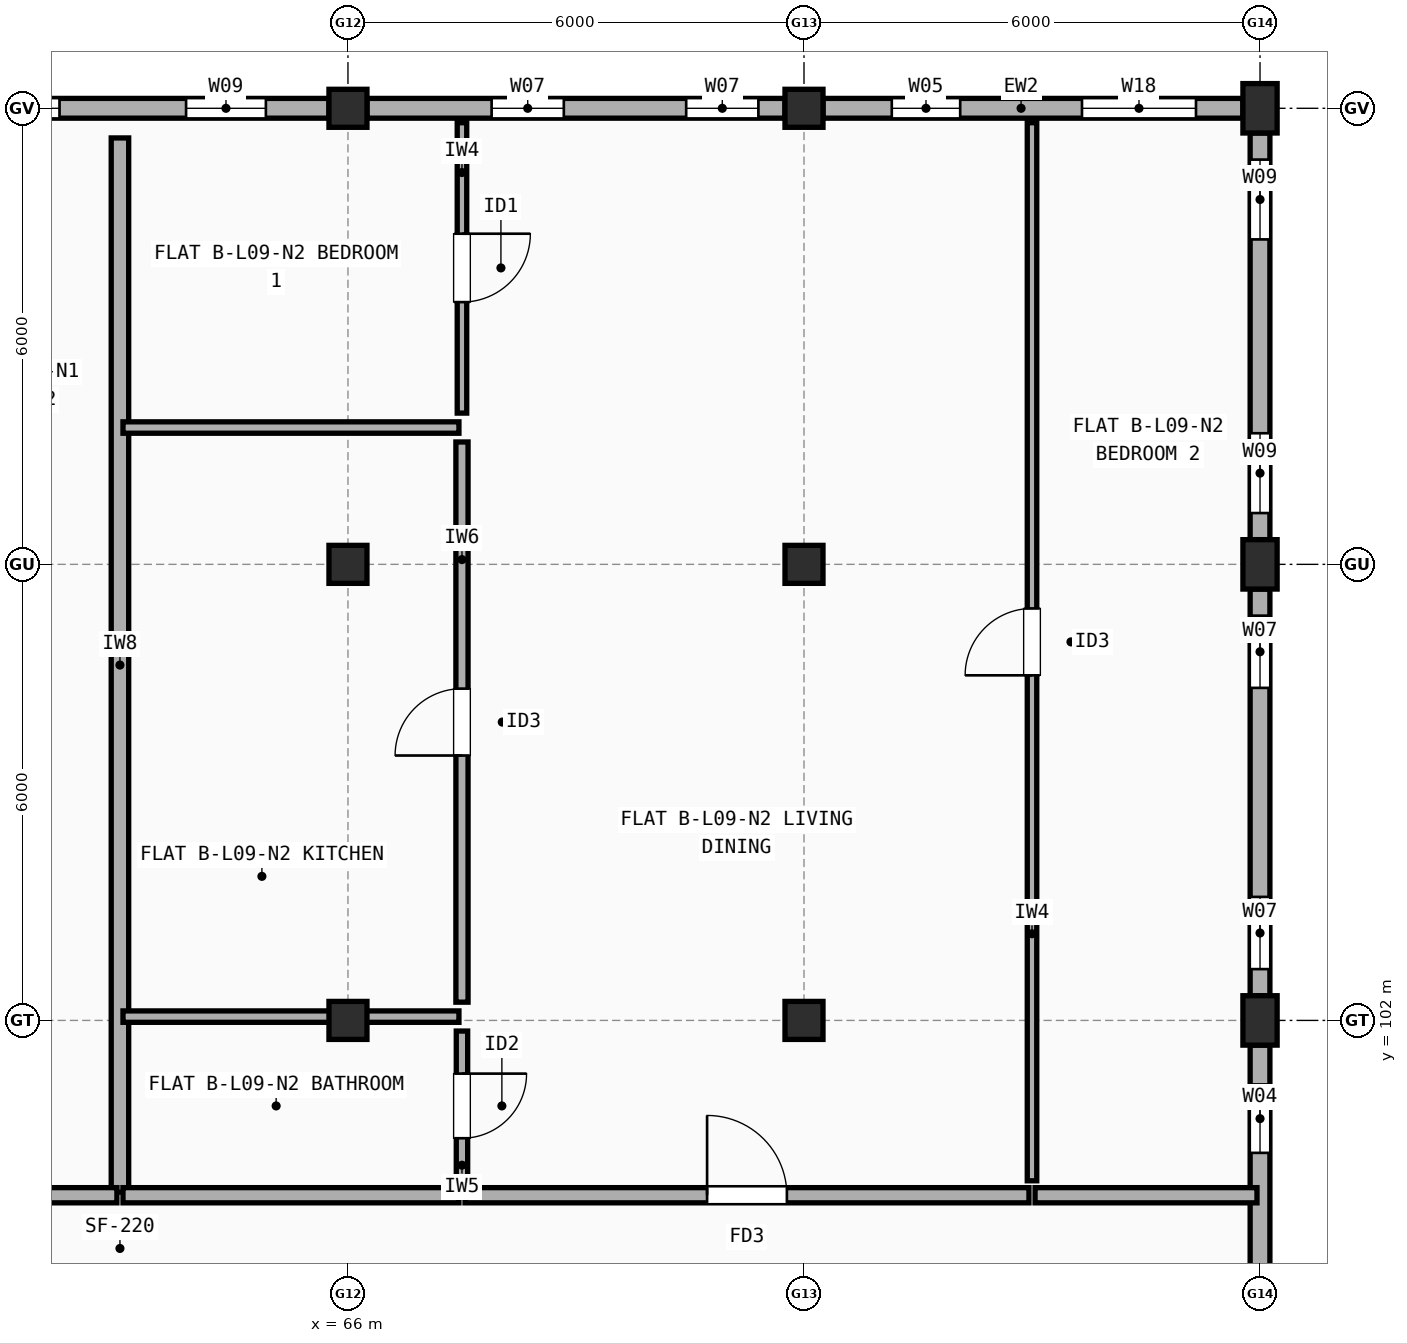
"""IFC4 building model, lengths in metres.
Left out: names, types, materials, properties, quantities, classifications, styles, units other than length and angle.
Written with IfcOpenShell. Run it as: python <this file> out.ifc"""

import sys

from ifc_helpers import new_model, si_unit, direction, frame, frame_2d, origin, origin_2d, place, context, subcontext, project, spatial, rectangle, extrude, element, fill, save


model = new_model("IFC4")
c1 = context("Model", 3, precision=1e-05, world=origin(), true_north=direction((0.0, 1.0)))
c2 = subcontext(c1, "Body", "Model", "MODEL_VIEW")
j1 = project(units=[si_unit("LENGTHUNIT", "METRE"), si_unit("PLANEANGLEUNIT", "RADIAN")], contexts=[c1])
p1 = place(None, origin())
s1 = spatial("IfcSite", under=j1, at=p1, CompositionType="ELEMENT")
p2 = place(p1, origin())
s2 = spatial("IfcBuilding", under=s1, at=p2, CompositionType="ELEMENT")
p3 = place(p2, frame((0.0, 0.0, 30.1)))
s3 = spatial("IfcBuildingStorey", under=s2, at=p3, CompositionType="ELEMENT", Elevation=30.1)
for number, where, z_axis, x_axis in (
    (1, (66.0, 102.0, 0.0), (0.0, 0.0, 1.0), (1.0, 0.0, 0.0)),
    (2, (66.0, 108.0, 0.0), (0.0, 0.0, 1.0), (1.0, 0.0, 0.0)),
    (3, (66.0, 114.0, 0.0), (0.0, 0.0, 1.0), (1.0, 0.0, 0.0)),
    (4, (72.0, 102.0, 0.0), (0.0, 0.0, 1.0), (1.0, 0.0, 0.0)),
    (5, (72.0, 108.0, 0.0), (0.0, 0.0, 1.0), (1.0, 0.0, 0.0)),
    (6, (72.0, 114.0, 0.0), (0.0, 0.0, 1.0), (1.0, 0.0, 0.0)),
):
    element("IfcColumn", number, at=place(p3, frame(where, z_axis=z_axis, x_axis=x_axis)), inside=s3, PredefinedType="COLUMN", context=c2, shape_type="SweptSolid", body=[
        extrude(rectangle(XDim=0.5, YDim=0.5, at=origin_2d()), origin(), (0.0, 0.0, 1.0), 2.985),
    ])
for number, where, z_axis, x_axis in (
    (7, (78.0, 102.0, 0.0), (0.0, 0.0, 1.0), (1.0, 0.0, 0.0)),
    (8, (78.0, 108.0, 0.0), (0.0, 0.0, 1.0), (1.0, 0.0, 0.0)),
    (9, (78.0, 114.0, 0.0), (0.0, 0.0, 1.0), (1.0, 0.0, 0.0)),
):
    element("IfcColumn", number, at=place(p3, frame(where, z_axis=z_axis, x_axis=x_axis)), inside=s3, PredefinedType="COLUMN", context=c2, shape_type="SweptSolid", body=[
        extrude(rectangle(XDim=0.45, YDim=0.65, at=origin_2d()), origin(), (0.0, 0.0, 1.0), 2.985),
    ])
p4 = place(p3, frame((78.0, 96.325, 0.0), z_axis=(0.0, 0.0, 1.0), x_axis=(0.0, 1.0, 0.0)))
e10 = element("IfcWall", 10, at=p4, inside=s3, PredefinedType="STANDARD", context=c2, shape_type="SweptSolid", body=[
    extrude(rectangle(XDim=5.35, YDim=0.26, at=frame_2d((2.675, 0.0))), origin(), (0.0, 0.0, 1.0), 2.467),
])
p5 = place(p4, frame((0.917, 0.0, 0.9)))
e11 = element("IfcOpeningElement", 11, at=p5, cuts=e10, PredefinedType="OPENING", context=c2, shape_type="SweptSolid", body=[
    extrude(rectangle(XDim=1.5, YDim=1.4, at=frame_2d((0.75, 0.7))), frame((0.0, 0.14, 0.0), z_axis=(0.0, -1.0, 0.0), x_axis=(1.0, 0.0, 0.0)), (0.0, 0.0, 1.0), 0.28),
])
p6 = place(p4, frame((3.933, 0.0, 0.9)))
e12 = element("IfcOpeningElement", 12, at=p6, cuts=e10, PredefinedType="OPENING", context=c2, shape_type="SweptSolid", body=[
    extrude(rectangle(XDim=0.9, YDim=1.3, at=frame_2d((0.45, 0.65))), frame((0.0, 0.14, 0.0), z_axis=(0.0, -1.0, 0.0), x_axis=(1.0, 0.0, 0.0)), (0.0, 0.0, 1.0), 0.28),
])
p7 = place(p3, frame((78.0, 102.325, 0.0), z_axis=(0.0, 0.0, 1.0), x_axis=(0.0, 1.0, 0.0)))
e13 = element("IfcWall", 13, at=p7, inside=s3, PredefinedType="STANDARD", context=c2, shape_type="SweptSolid", body=[
    extrude(rectangle(XDim=5.35, YDim=0.26, at=frame_2d((2.675, 0.0))), origin(), (0.0, 0.0, 1.0), 2.467),
])
p8 = place(p7, frame((0.35, 0.0, 0.9)))
e14 = element("IfcOpeningElement", 14, at=p8, cuts=e13, PredefinedType="OPENING", context=c2, shape_type="SweptSolid", body=[
    extrude(rectangle(XDim=0.95, YDim=1.35, at=frame_2d((0.475, 0.675))), frame((0.0, 0.14, 0.0), z_axis=(0.0, -1.0, 0.0), x_axis=(1.0, 0.0, 0.0)), (0.0, 0.0, 1.0), 0.28),
])
p9 = place(p7, frame((4.05, 0.0, 0.9)))
e15 = element("IfcOpeningElement", 15, at=p9, cuts=e13, PredefinedType="OPENING", context=c2, shape_type="SweptSolid", body=[
    extrude(rectangle(XDim=0.95, YDim=1.35, at=frame_2d((0.475, 0.675))), frame((0.0, 0.14, 0.0), z_axis=(0.0, -1.0, 0.0), x_axis=(1.0, 0.0, 0.0)), (0.0, 0.0, 1.0), 0.28),
])
p10 = place(p3, frame((78.0, 108.325, 0.0), z_axis=(0.0, 0.0, 1.0), x_axis=(0.0, 1.0, 0.0)))
e16 = element("IfcWall", 16, at=p10, inside=s3, PredefinedType="STANDARD", context=c2, shape_type="SweptSolid", body=[
    extrude(rectangle(XDim=5.35, YDim=0.26, at=frame_2d((2.675, 0.0))), origin(), (0.0, 0.0, 1.0), 2.467),
])
p11 = place(p10, frame((0.35, 0.0, 0.9)))
e17 = element("IfcOpeningElement", 17, at=p11, cuts=e16, PredefinedType="OPENING", context=c2, shape_type="SweptSolid", body=[
    extrude(rectangle(XDim=1.05, YDim=1.35, at=frame_2d((0.525, 0.675))), frame((0.0, 0.14, 0.0), z_axis=(0.0, -1.0, 0.0), x_axis=(1.0, 0.0, 0.0)), (0.0, 0.0, 1.0), 0.28),
])
p12 = place(p10, frame((3.95, 0.0, 0.9)))
e18 = element("IfcOpeningElement", 18, at=p12, cuts=e16, PredefinedType="OPENING", context=c2, shape_type="SweptSolid", body=[
    extrude(rectangle(XDim=1.05, YDim=1.35, at=frame_2d((0.525, 0.675))), frame((0.0, 0.14, 0.0), z_axis=(0.0, -1.0, 0.0), x_axis=(1.0, 0.0, 0.0)), (0.0, 0.0, 1.0), 0.28),
])
p13 = place(p3, frame((77.775, 114.0, 0.0), z_axis=(0.0, 0.0, 1.0), x_axis=(-1.0, 0.0, 0.0)))
e19 = element("IfcWall", 19, at=p13, inside=s3, PredefinedType="STANDARD", context=c2, shape_type="SweptSolid", body=[
    extrude(rectangle(XDim=5.525, YDim=0.26, at=frame_2d((2.762, 0.0))), origin(), (0.0, 0.0, 1.0), 2.467),
])
p14 = place(p13, frame((0.617, 0.0, 0.9)))
e20 = element("IfcOpeningElement", 20, at=p14, cuts=e19, PredefinedType="OPENING", context=c2, shape_type="SweptSolid", body=[
    extrude(rectangle(XDim=1.5, YDim=1.4, at=frame_2d((0.75, 0.7))), frame((0.0, 0.14, 0.0), z_axis=(0.0, -1.0, 0.0), x_axis=(1.0, 0.0, 0.0)), (0.0, 0.0, 1.0), 0.28),
])
p15 = place(p13, frame((3.72, 0.0, 0.9)))
e21 = element("IfcOpeningElement", 21, at=p15, cuts=e19, PredefinedType="OPENING", context=c2, shape_type="SweptSolid", body=[
    extrude(rectangle(XDim=0.9, YDim=1.4, at=frame_2d((0.45, 0.7))), frame((0.0, 0.14, 0.0), z_axis=(0.0, -1.0, 0.0), x_axis=(1.0, 0.0, 0.0)), (0.0, 0.0, 1.0), 0.28),
])
p16 = place(p3, frame((71.75, 114.0, 0.0), z_axis=(0.0, 0.0, 1.0), x_axis=(-1.0, 0.0, 0.0)))
e22 = element("IfcWall", 22, at=p16, inside=s3, PredefinedType="STANDARD", context=c2, shape_type="SweptSolid", body=[
    extrude(rectangle(XDim=5.5, YDim=0.26, at=frame_2d((2.75, 0.0))), origin(), (0.0, 0.0, 1.0), 2.467),
])
p17 = place(p16, frame((0.35, 0.0, 0.9)))
e23 = element("IfcOpeningElement", 23, at=p17, cuts=e22, PredefinedType="OPENING", context=c2, shape_type="SweptSolid", body=[
    extrude(rectangle(XDim=0.95, YDim=1.35, at=frame_2d((0.475, 0.675))), frame((0.0, 0.14, 0.0), z_axis=(0.0, -1.0, 0.0), x_axis=(1.0, 0.0, 0.0)), (0.0, 0.0, 1.0), 0.28),
])
p18 = place(p16, frame((2.91, 0.0, 0.9)))
e24 = element("IfcOpeningElement", 24, at=p18, cuts=e22, PredefinedType="OPENING", context=c2, shape_type="SweptSolid", body=[
    extrude(rectangle(XDim=0.95, YDim=1.35, at=frame_2d((0.475, 0.675))), frame((0.0, 0.14, 0.0), z_axis=(0.0, -1.0, 0.0), x_axis=(1.0, 0.0, 0.0)), (0.0, 0.0, 1.0), 0.28),
])
p19 = place(p3, frame((65.75, 114.0, 0.0), z_axis=(0.0, 0.0, 1.0), x_axis=(-1.0, 0.0, 0.0)))
e25 = element("IfcWall", 25, at=p19, inside=s3, PredefinedType="STANDARD", context=c2, shape_type="SweptSolid", body=[
    extrude(rectangle(XDim=5.5, YDim=0.26, at=frame_2d((2.75, 0.0))), origin(), (0.0, 0.0, 1.0), 2.467),
])
p20 = place(p19, frame((0.83, 0.0, 0.9)))
e26 = element("IfcOpeningElement", 26, at=p20, cuts=e25, PredefinedType="OPENING", context=c2, shape_type="SweptSolid", body=[
    extrude(rectangle(XDim=1.05, YDim=1.35, at=frame_2d((0.525, 0.675))), frame((0.0, 0.14, 0.0), z_axis=(0.0, -1.0, 0.0), x_axis=(1.0, 0.0, 0.0)), (0.0, 0.0, 1.0), 0.28),
])
p21 = place(p19, frame((3.545, 0.0, 0.9)))
e27 = element("IfcOpeningElement", 27, at=p21, cuts=e25, PredefinedType="OPENING", context=c2, shape_type="SweptSolid", body=[
    extrude(rectangle(XDim=1.2, YDim=1.35, at=frame_2d((0.6, 0.675))), frame((0.0, 0.14, 0.0), z_axis=(0.0, -1.0, 0.0), x_axis=(1.0, 0.0, 0.0)), (0.0, 0.0, 1.0), 0.28),
])
p22 = place(p3, frame((63.0, 99.74, 0.0), z_axis=(0.0, 0.0, 1.0), x_axis=(0.0, 1.0, 0.0)))
e28 = element("IfcWall", 28, at=p22, inside=s3, PredefinedType="SOLIDWALL", context=c2, shape_type="SweptSolid", body=[
    extrude(rectangle(XDim=13.87, YDim=0.23, at=frame_2d((6.935, 0.0))), origin(), (0.0, 0.0, 1.0), 2.467),
])
p23 = place(p3, frame((60.04, 99.7, 0.0), z_axis=(0.0, 0.0, 1.0), x_axis=(1.0, 0.0, 0.0)))
e29 = element("IfcWall", 29, at=p23, inside=s3, PredefinedType="SOLIDWALL", context=c2, shape_type="SweptSolid", body=[
    extrude(rectangle(XDim=2.92, YDim=0.2, at=frame_2d((1.46, 0.0))), origin(), (0.0, 0.0, 1.0), 2.508),
])
p24 = place(p3, frame((63.04, 99.7, 0.0), z_axis=(0.0, 0.0, 1.0), x_axis=(1.0, 0.0, 0.0)))
e30 = element("IfcWall", 30, at=p24, inside=s3, PredefinedType="SOLIDWALL", context=c2, shape_type="SweptSolid", body=[
    extrude(rectangle(XDim=4.42, YDim=0.2, at=frame_2d((2.21, 0.0))), origin(), (0.0, 0.0, 1.0), 2.985),
])
p25 = place(p3, frame((67.54, 99.7, 0.0), z_axis=(0.0, 0.0, 1.0), x_axis=(1.0, 0.0, 0.0)))
e31 = element("IfcWall", 31, at=p25, inside=s3, PredefinedType="SOLIDWALL", context=c2, shape_type="SweptSolid", body=[
    extrude(rectangle(XDim=7.42, YDim=0.2, at=frame_2d((3.71, 0.0))), origin(), (0.0, 0.0, 1.0), 2.985),
])
p26 = place(p25, frame((3.185, 0.0, 0.0)))
e32 = element("IfcOpeningElement", 32, at=p26, cuts=e31, PredefinedType="OPENING", context=c2, shape_type="SweptSolid", body=[
    extrude(rectangle(XDim=1.05, YDim=2.15, at=frame_2d((0.525, 1.075))), frame((0.0, 0.11, 0.0), z_axis=(0.0, -1.0, 0.0), x_axis=(1.0, 0.0, 0.0)), (0.0, 0.0, 1.0), 0.22),
])
p27 = place(p3, frame((67.5, 109.99, 0.0), z_axis=(0.0, 0.0, 1.0), x_axis=(0.0, 1.0, 0.0)))
e33 = element("IfcWall", 33, at=p27, inside=s3, PredefinedType="PARTITIONING", context=c2, shape_type="SweptSolid", body=[
    extrude(rectangle(XDim=3.82, YDim=0.125, at=frame_2d((1.91, 0.0))), origin(), (0.0, 0.0, 1.0), 2.985),
])
p28 = place(p27, frame((1.46, 0.0, 0.0)))
e34 = element("IfcOpeningElement", 34, at=p28, cuts=e33, PredefinedType="OPENING", context=c2, shape_type="SweptSolid", body=[
    extrude(rectangle(XDim=0.9, YDim=2.1, at=frame_2d((0.45, 1.05))), frame((0.0, 0.073, 0.0), z_axis=(0.0, -1.0, 0.0), x_axis=(1.0, 0.0, 0.0)), (0.0, 0.0, 1.0), 0.145),
])
p29 = place(p3, frame((67.5, 102.24, 0.0), z_axis=(0.0, 0.0, 1.0), x_axis=(0.0, 1.0, 0.0)))
e35 = element("IfcWall", 35, at=p29, inside=s3, PredefinedType="PLUMBINGWALL", context=c2, shape_type="SweptSolid", body=[
    extrude(rectangle(XDim=7.37, YDim=0.16, at=frame_2d((3.685, 0.0))), origin(), (0.0, 0.0, 1.0), 2.467),
])
p30 = place(p29, frame((3.245, 0.0, 0.0)))
e36 = element("IfcOpeningElement", 36, at=p30, cuts=e35, PredefinedType="OPENING", context=c2, shape_type="SweptSolid", body=[
    extrude(rectangle(XDim=0.88, YDim=2.1, at=frame_2d((0.44, 1.05))), frame((0.0, 0.09, 0.0), z_axis=(0.0, -1.0, 0.0), x_axis=(1.0, 0.0, 0.0)), (0.0, 0.0, 1.0), 0.18),
])
p31 = place(p3, frame((67.5, 99.89, 0.0), z_axis=(0.0, 0.0, 1.0), x_axis=(0.0, 1.0, 0.0)))
e37 = element("IfcWall", 37, at=p31, inside=s3, PredefinedType="PARTITIONING", context=c2, shape_type="SweptSolid", body=[
    extrude(rectangle(XDim=1.97, YDim=0.15, at=frame_2d((0.985, 0.0))), origin(), (0.0, 0.0, 1.0), 2.985),
])
p32 = place(p31, frame((0.56, 0.0, 0.0)))
e38 = element("IfcOpeningElement", 38, at=p32, cuts=e37, PredefinedType="OPENING", context=c2, shape_type="SweptSolid", body=[
    extrude(rectangle(XDim=0.85, YDim=2.1, at=frame_2d((0.425, 1.05))), frame((0.0, 0.085, 0.0), z_axis=(0.0, -1.0, 0.0), x_axis=(1.0, 0.0, 0.0)), (0.0, 0.0, 1.0), 0.17),
])
p33 = place(p3, frame((63.04, 109.8, 0.0), z_axis=(0.0, 0.0, 1.0), x_axis=(1.0, 0.0, 0.0)))
e39 = element("IfcWall", 39, at=p33, inside=s3, PredefinedType="PARTITIONING", context=c2, shape_type="SweptSolid", body=[
    extrude(rectangle(XDim=4.42, YDim=0.15, at=frame_2d((2.21, 0.0))), origin(), (0.0, 0.0, 1.0), 2.508),
])
p34 = place(p3, frame((63.04, 102.05, 0.0), z_axis=(0.0, 0.0, 1.0), x_axis=(1.0, 0.0, 0.0)))
e40 = element("IfcWall", 40, at=p34, inside=s3, PredefinedType="PARTITIONING", context=c2, shape_type="SweptSolid", body=[
    extrude(rectangle(XDim=4.42, YDim=0.15, at=frame_2d((2.21, 0.0))), origin(), (0.0, 0.0, 1.0), 2.467),
])
p35 = place(p3, frame((75.04, 99.7, 0.0), z_axis=(0.0, 0.0, 1.0), x_axis=(1.0, 0.0, 0.0)))
e41 = element("IfcWall", 41, at=p35, inside=s3, PredefinedType="SOLIDWALL", context=c2, shape_type="SweptSolid", body=[
    extrude(rectangle(XDim=2.92, YDim=0.2, at=frame_2d((1.46, 0.0))), origin(), (0.0, 0.0, 1.0), 2.467),
])
p36 = place(p3, frame((75.0, 99.89, 0.0), z_axis=(0.0, 0.0, 1.0), x_axis=(0.0, 1.0, 0.0)))
e42 = element("IfcWall", 42, at=p36, inside=s3, PredefinedType="PARTITIONING", context=c2, shape_type="SweptSolid", body=[
    extrude(rectangle(XDim=13.92, YDim=0.125, at=frame_2d((6.96, 0.0))), origin(), (0.0, 0.0, 1.0), 2.467),
])
p37 = place(p36, frame((6.65, 0.0, 0.0)))
e43 = element("IfcOpeningElement", 43, at=p37, cuts=e42, PredefinedType="OPENING", context=c2, shape_type="SweptSolid", body=[
    extrude(rectangle(XDim=0.88, YDim=2.1, at=frame_2d((0.44, 1.05))), frame((0.0, 0.073, 0.0), z_axis=(0.0, -1.0, 0.0), x_axis=(1.0, 0.0, 0.0)), (0.0, 0.0, 1.0), 0.145),
])
p38 = place(p6, origin())
e44 = element("IfcWindow", 44, at=p38, inside=s3, PartitioningType="SINGLE_PANEL", PredefinedType="WINDOW", context=c2, shape_type="SweptSolid", body=[
    extrude(rectangle(XDim=0.9, YDim=1.3, at=frame_2d((0.45, 0.65))), frame((0.0, 0.03, 0.0), z_axis=(0.0, -1.0, 0.0), x_axis=(1.0, 0.0, 0.0)), (0.0, 0.0, 1.0), 0.06),
])
fill(e12, e44)
p39 = place(p8, origin())
e45 = element("IfcWindow", 45, at=p39, inside=s3, PartitioningType="SINGLE_PANEL", PredefinedType="WINDOW", context=c2, shape_type="SweptSolid", body=[
    extrude(rectangle(XDim=0.95, YDim=1.35, at=frame_2d((0.475, 0.675))), frame((0.0, 0.03, 0.0), z_axis=(0.0, -1.0, 0.0), x_axis=(1.0, 0.0, 0.0)), (0.0, 0.0, 1.0), 0.06),
])
fill(e14, e45)
p40 = place(p9, origin())
e46 = element("IfcWindow", 46, at=p40, inside=s3, PartitioningType="SINGLE_PANEL", PredefinedType="WINDOW", context=c2, shape_type="SweptSolid", body=[
    extrude(rectangle(XDim=0.95, YDim=1.35, at=frame_2d((0.475, 0.675))), frame((0.0, 0.03, 0.0), z_axis=(0.0, -1.0, 0.0), x_axis=(1.0, 0.0, 0.0)), (0.0, 0.0, 1.0), 0.06),
])
fill(e15, e46)
p41 = place(p11, origin())
e47 = element("IfcWindow", 47, at=p41, inside=s3, PartitioningType="SINGLE_PANEL", PredefinedType="WINDOW", context=c2, shape_type="SweptSolid", body=[
    extrude(rectangle(XDim=1.05, YDim=1.35, at=frame_2d((0.525, 0.675))), frame((0.0, 0.03, 0.0), z_axis=(0.0, -1.0, 0.0), x_axis=(1.0, 0.0, 0.0)), (0.0, 0.0, 1.0), 0.06),
])
fill(e17, e47)
p42 = place(p12, origin())
e48 = element("IfcWindow", 48, at=p42, inside=s3, PartitioningType="SINGLE_PANEL", PredefinedType="WINDOW", context=c2, shape_type="SweptSolid", body=[
    extrude(rectangle(XDim=1.05, YDim=1.35, at=frame_2d((0.525, 0.675))), frame((0.0, 0.03, 0.0), z_axis=(0.0, -1.0, 0.0), x_axis=(1.0, 0.0, 0.0)), (0.0, 0.0, 1.0), 0.06),
])
fill(e18, e48)
p43 = place(p14, origin())
e49 = element("IfcWindow", 49, at=p43, inside=s3, PartitioningType="SINGLE_PANEL", PredefinedType="WINDOW", context=c2, shape_type="SweptSolid", body=[
    extrude(rectangle(XDim=1.5, YDim=1.4, at=frame_2d((0.75, 0.7))), frame((0.0, 0.03, 0.0), z_axis=(0.0, -1.0, 0.0), x_axis=(1.0, 0.0, 0.0)), (0.0, 0.0, 1.0), 0.06),
])
fill(e20, e49)
p44 = place(p15, origin())
e50 = element("IfcWindow", 50, at=p44, inside=s3, PartitioningType="SINGLE_PANEL", PredefinedType="WINDOW", context=c2, shape_type="SweptSolid", body=[
    extrude(rectangle(XDim=0.9, YDim=1.4, at=frame_2d((0.45, 0.7))), frame((0.0, 0.03, 0.0), z_axis=(0.0, -1.0, 0.0), x_axis=(1.0, 0.0, 0.0)), (0.0, 0.0, 1.0), 0.06),
])
fill(e21, e50)
p45 = place(p17, origin())
e51 = element("IfcWindow", 51, at=p45, inside=s3, PartitioningType="SINGLE_PANEL", PredefinedType="WINDOW", context=c2, shape_type="SweptSolid", body=[
    extrude(rectangle(XDim=0.95, YDim=1.35, at=frame_2d((0.475, 0.675))), frame((0.0, 0.03, 0.0), z_axis=(0.0, -1.0, 0.0), x_axis=(1.0, 0.0, 0.0)), (0.0, 0.0, 1.0), 0.06),
])
fill(e23, e51)
p46 = place(p18, origin())
e52 = element("IfcWindow", 52, at=p46, inside=s3, PartitioningType="SINGLE_PANEL", PredefinedType="WINDOW", context=c2, shape_type="SweptSolid", body=[
    extrude(rectangle(XDim=0.95, YDim=1.35, at=frame_2d((0.475, 0.675))), frame((0.0, 0.03, 0.0), z_axis=(0.0, -1.0, 0.0), x_axis=(1.0, 0.0, 0.0)), (0.0, 0.0, 1.0), 0.06),
])
fill(e24, e52)
p47 = place(p20, origin())
e53 = element("IfcWindow", 53, at=p47, inside=s3, PartitioningType="SINGLE_PANEL", PredefinedType="WINDOW", context=c2, shape_type="SweptSolid", body=[
    extrude(rectangle(XDim=1.05, YDim=1.35, at=frame_2d((0.525, 0.675))), frame((0.0, 0.03, 0.0), z_axis=(0.0, -1.0, 0.0), x_axis=(1.0, 0.0, 0.0)), (0.0, 0.0, 1.0), 0.06),
])
fill(e26, e53)
p48 = place(p21, origin())
e54 = element("IfcWindow", 54, at=p48, inside=s3, PartitioningType="SINGLE_PANEL", PredefinedType="WINDOW", context=c2, shape_type="SweptSolid", body=[
    extrude(rectangle(XDim=1.2, YDim=1.35, at=frame_2d((0.6, 0.675))), frame((0.0, 0.03, 0.0), z_axis=(0.0, -1.0, 0.0), x_axis=(1.0, 0.0, 0.0)), (0.0, 0.0, 1.0), 0.06),
])
fill(e27, e54)
p49 = place(p26, origin())
e55 = element("IfcDoor", 55, at=p49, inside=s3, OperationType="SINGLE_SWING_LEFT", PredefinedType="DOOR", context=c2, shape_type="SweptSolid", body=[
    extrude(rectangle(XDim=1.05, YDim=2.15, at=frame_2d((0.525, 1.075))), frame((0.0, 0.025, 0.0), z_axis=(0.0, -1.0, 0.0), x_axis=(1.0, 0.0, 0.0)), (0.0, 0.0, 1.0), 0.05),
])
fill(e32, e55)
p50 = place(p28, origin())
e56 = element("IfcDoor", 56, at=p50, inside=s3, OperationType="SINGLE_SWING_RIGHT", PredefinedType="DOOR", context=c2, shape_type="SweptSolid", body=[
    extrude(rectangle(XDim=0.9, YDim=2.1, at=frame_2d((0.45, 1.05))), frame((0.0, 0.025, 0.0), z_axis=(0.0, -1.0, 0.0), x_axis=(1.0, 0.0, 0.0)), (0.0, 0.0, 1.0), 0.05),
])
fill(e34, e56)
p51 = place(p30, origin())
e57 = element("IfcDoor", 57, at=p51, inside=s3, OperationType="SINGLE_SWING_LEFT", PredefinedType="DOOR", context=c2, shape_type="SweptSolid", body=[
    extrude(rectangle(XDim=0.88, YDim=2.1, at=frame_2d((0.44, 1.05))), frame((0.0, 0.025, 0.0), z_axis=(0.0, -1.0, 0.0), x_axis=(1.0, 0.0, 0.0)), (0.0, 0.0, 1.0), 0.05),
])
fill(e36, e57)
p52 = place(p32, origin())
e58 = element("IfcDoor", 58, at=p52, inside=s3, OperationType="SINGLE_SWING_RIGHT", PredefinedType="DOOR", context=c2, shape_type="SweptSolid", body=[
    extrude(rectangle(XDim=0.85, YDim=2.1, at=frame_2d((0.425, 1.05))), frame((0.0, 0.025, 0.0), z_axis=(0.0, -1.0, 0.0), x_axis=(1.0, 0.0, 0.0)), (0.0, 0.0, 1.0), 0.05),
])
fill(e38, e58)
p53 = place(p37, origin())
e59 = element("IfcDoor", 59, at=p53, inside=s3, OperationType="SINGLE_SWING_LEFT", PredefinedType="DOOR", context=c2, shape_type="SweptSolid", body=[
    extrude(rectangle(XDim=0.88, YDim=2.1, at=frame_2d((0.44, 1.05))), frame((0.0, 0.025, 0.0), z_axis=(0.0, -1.0, 0.0), x_axis=(1.0, 0.0, 0.0)), (0.0, 0.0, 1.0), 0.05),
])
fill(e43, e59)
save(model, sys.argv[1])
